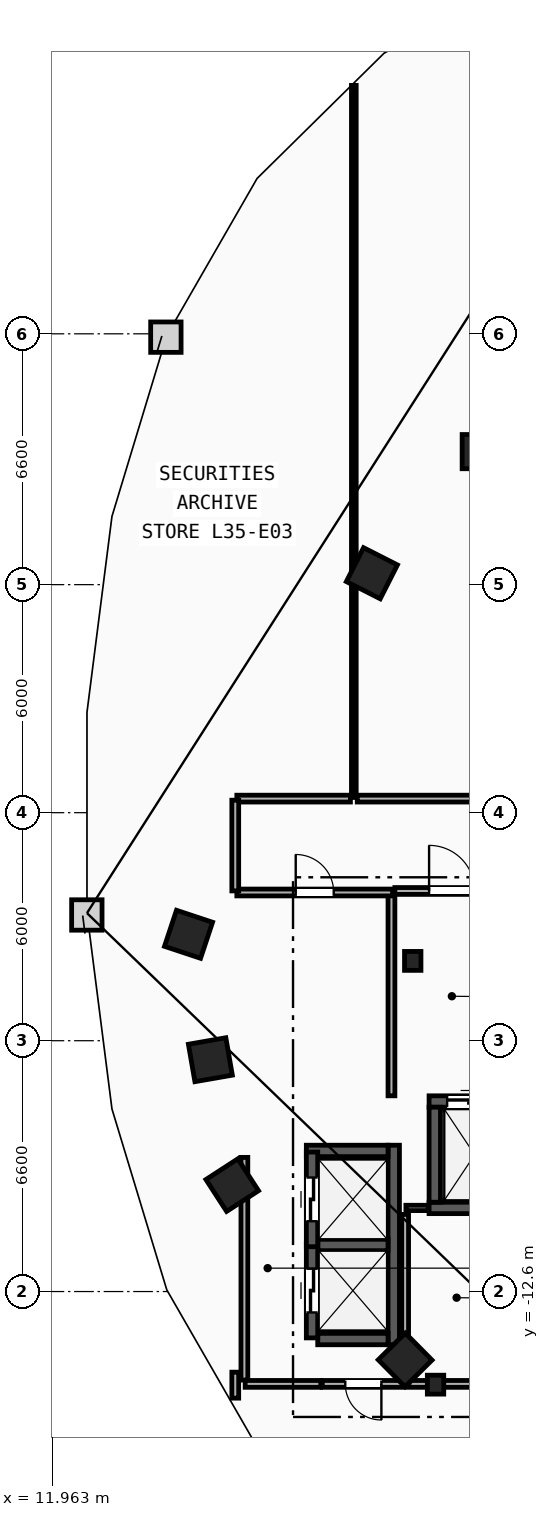
"""IFC4 building model, lengths in metres.
Left out: names, types, materials, properties, quantities, classifications, styles, units other than length and angle.
Written with IfcOpenShell. Run it as: python <this file> out.ifc"""

import sys

from ifc_helpers import new_model, si_unit, direction, frame, frame_2d, origin, origin_2d, place, context, subcontext, project, spatial, rectangle, i_section, extrude, element, fill, save


model = new_model("IFC4")
c1 = context("Model", 3, precision=1e-05, world=origin(), true_north=direction((0.0, 1.0)))
c2 = subcontext(c1, "Body", "Model", "MODEL_VIEW")
j1 = project(units=[si_unit("LENGTHUNIT", "METRE"), si_unit("PLANEANGLEUNIT", "RADIAN")], contexts=[c1])
p1 = place(None, origin())
s1 = spatial("IfcSite", under=j1, at=p1, CompositionType="ELEMENT")
p2 = place(p1, origin())
s2 = spatial("IfcBuilding", under=s1, at=p2, CompositionType="ELEMENT")
p3 = place(p2, frame((0.0, 0.0, 136.8)))
s3 = spatial("IfcBuildingStorey", under=s2, at=p3, CompositionType="ELEMENT", Elevation=136.8)
for number, where, z_axis, x_axis in (
    (1, (21.45, -3.9, 0.0), (0.0, 0.0, 1.0), (1.0, 0.0, 0.0)),
    (2, (22.05, -15.05, 0.0), (0.0, 0.0, 1.0), (1.0, 0.0, 0.0)),
):
    element("IfcColumn", number, at=place(p3, frame(where, z_axis=z_axis, x_axis=x_axis)), inside=s3, PredefinedType="COLUMN", context=c2, shape_type="SweptSolid", body=[
        extrude(i_section(OverallWidth=0.432, OverallDepth=0.498, WebThickness=0.056, FlangeThickness=0.089, FilletRadius=0.018, at=origin_2d()), origin(), (0.0, 0.0, 1.0), 3.6),
    ])
p4 = place(p3, frame((23.2, 9.5, 0.0), z_axis=(0.0, 0.0, 1.0), x_axis=(1.0, 0.0, 0.0)))
e3 = element("IfcColumn", 3, at=p4, inside=s3, PredefinedType="COLUMN", context=c2, shape_type="SweptSolid", body=[
    extrude(rectangle(XDim=0.9, YDim=0.9, at=origin_2d()), origin(), (0.0, 0.0, 1.0), 3.6),
])
for number, where, z_axis, x_axis in (
    (4, (15.55, -3.2, 0.0), (0.0, 0.0, 1.0), (-0.315, -0.949, 0.0)),
    (5, (16.125, -6.5, 0.0), (0.0, 0.0, 1.0), (0.172, -0.985, 0.0)),
    (6, (16.7, -9.8, 0.0), (0.0, 0.0, 1.0), (0.544, -0.839, 0.0)),
    (7, (21.25, -14.4, 0.0), (0.0, 0.0, 1.0), (0.703, -0.711, 0.0)),
    (8, (20.375, 6.3, 0.0), (0.0, 0.0, 1.0), (-0.453, -0.892, 0.0)),
):
    element("IfcColumn", number, at=place(p3, frame(where, z_axis=z_axis, x_axis=x_axis)), inside=s3, PredefinedType="COLUMN", context=c2, shape_type="SweptSolid", body=[
        extrude(rectangle(XDim=1.0, YDim=1.0, at=origin_2d()), origin(), (0.0, 0.0, 1.0), 3.6),
    ])
p5 = place(p3, frame((20.89, -7.45, 0.0), z_axis=(0.0, 0.0, 1.0), x_axis=(0.0, 1.0, 0.0)))
e9 = element("IfcWall", 9, at=p5, inside=s3, PredefinedType="PARTITIONING", context=c2, shape_type="SweptSolid", body=[
    extrude(rectangle(XDim=5.3, YDim=0.18, at=frame_2d((2.65, 0.0))), origin(), (0.0, 0.0, 1.0), 3.36),
])
p6 = place(p3, frame((20.98, -2.06, 0.0), z_axis=(0.0, 0.0, 1.0), x_axis=(1.0, 0.0, 0.0)))
e10 = element("IfcWall", 10, at=p6, inside=s3, PredefinedType="PARTITIONING", context=c2, shape_type="SweptSolid", body=[
    extrude(rectangle(XDim=3.0, YDim=0.18, at=frame_2d((1.5, 0.0))), origin(), (0.0, 0.0, 1.0), 3.36),
])
p7 = place(p6, frame((0.9, 0.0, 0.0)))
e11 = element("IfcOpeningElement", 11, at=p7, cuts=e10, PredefinedType="OPENING", context=c2, shape_type="SweptSolid", body=[
    extrude(rectangle(XDim=1.2, YDim=2.15, at=frame_2d((0.6, 1.075))), frame((0.0, 0.1, 0.0), z_axis=(0.0, -1.0, 0.0), x_axis=(1.0, 0.0, 0.0)), (0.0, 0.0, 1.0), 0.2),
])
p8 = place(p3, frame((21.88, -7.6, 0.0), z_axis=(0.0, 0.0, 1.0), x_axis=(1.0, 0.0, 0.0)))
e12 = element("IfcWall", 12, at=p8, inside=s3, PredefinedType="SHEAR", context=c2, shape_type="SweptSolid", body=[
    extrude(rectangle(XDim=2.1, YDim=0.3, at=frame_2d((1.05, 0.0))), origin(), (0.0, 0.0, 1.0), 3.36),
])
p9 = place(p8, frame((0.475, 0.0, 0.0)))
e13 = element("IfcOpeningElement", 13, at=p9, cuts=e12, PredefinedType="OPENING", context=c2, shape_type="SweptSolid", body=[
    extrude(rectangle(XDim=1.15, YDim=2.2, at=frame_2d((0.575, 1.1))), frame((0.0, 0.16, 0.0), z_axis=(0.0, -1.0, 0.0), x_axis=(1.0, 0.0, 0.0)), (0.0, 0.0, 1.0), 0.32),
])
p10 = place(p3, frame((21.88, -10.4, 0.0), z_axis=(0.0, 0.0, 1.0), x_axis=(1.0, 0.0, 0.0)))
e14 = element("IfcWall", 14, at=p10, inside=s3, PredefinedType="SHEAR", context=c2, shape_type="SweptSolid", body=[
    extrude(rectangle(XDim=2.1, YDim=0.3, at=frame_2d((1.05, 0.0))), origin(), (0.0, 0.0, 1.0), 3.36),
])
p11 = place(p3, frame((22.03, -10.25, 0.0), z_axis=(0.0, 0.0, 1.0), x_axis=(0.0, 1.0, 0.0)))
e15 = element("IfcWall", 15, at=p11, inside=s3, PredefinedType="SHEAR", context=c2, shape_type="SweptSolid", body=[
    extrude(rectangle(XDim=2.5, YDim=0.3, at=frame_2d((1.25, 0.0))), origin(), (0.0, 0.0, 1.0), 3.36),
])
p12 = place(p3, frame((20.95, -14.0, 0.0), z_axis=(0.0, 0.0, 1.0), x_axis=(0.0, 1.0, 0.0)))
e16 = element("IfcWall", 16, at=p12, inside=s3, PredefinedType="SHEAR", context=c2, shape_type="SweptSolid", body=[
    extrude(rectangle(XDim=5.25, YDim=0.3, at=frame_2d((2.625, 0.0))), origin(), (0.0, 0.0, 1.0), 3.36),
])
p13 = place(p3, frame((18.95, -13.85, 0.0), z_axis=(0.0, 0.0, 1.0), x_axis=(1.0, 0.0, 0.0)))
e17 = element("IfcWall", 17, at=p13, inside=s3, PredefinedType="SHEAR", context=c2, shape_type="SweptSolid", body=[
    extrude(rectangle(XDim=1.85, YDim=0.3, at=frame_2d((0.925, 0.0))), origin(), (0.0, 0.0, 1.0), 3.36),
])
p14 = place(p3, frame((18.65, -8.9, 0.0), z_axis=(0.0, 0.0, 1.0), x_axis=(1.0, 0.0, 0.0)))
e18 = element("IfcWall", 18, at=p14, inside=s3, PredefinedType="SHEAR", context=c2, shape_type="SweptSolid", body=[
    extrude(rectangle(XDim=2.15, YDim=0.3, at=frame_2d((1.075, 0.0))), origin(), (0.0, 0.0, 1.0), 3.36),
])
p15 = place(p3, frame((18.95, -11.375, 0.0), z_axis=(0.0, 0.0, 1.0), x_axis=(1.0, 0.0, 0.0)))
e19 = element("IfcWall", 19, at=p15, inside=s3, PredefinedType="SHEAR", context=c2, shape_type="SweptSolid", body=[
    extrude(rectangle(XDim=1.85, YDim=0.3, at=frame_2d((0.925, 0.0))), origin(), (0.0, 0.0, 1.0), 3.36),
])
p16 = place(p3, frame((18.8, -13.82, 0.0), z_axis=(0.0, 0.0, 1.0), x_axis=(0.0, 1.0, 0.0)))
e20 = element("IfcWall", 20, at=p16, inside=s3, PredefinedType="SHEAR", context=c2, shape_type="SweptSolid", body=[
    extrude(rectangle(XDim=2.49, YDim=0.3, at=frame_2d((1.245, 0.0))), origin(), (0.0, 0.0, 1.0), 3.36),
])
p17 = place(p16, frame((0.67, 0.0, 0.0)))
e21 = element("IfcOpeningElement", 21, at=p17, cuts=e20, PredefinedType="OPENING", context=c2, shape_type="SweptSolid", body=[
    extrude(rectangle(XDim=1.15, YDim=2.2, at=frame_2d((0.575, 1.1))), frame((0.0, 0.16, 0.0), z_axis=(0.0, -1.0, 0.0), x_axis=(1.0, 0.0, 0.0)), (0.0, 0.0, 1.0), 0.32),
])
p18 = place(p3, frame((18.8, -11.42, 0.0), z_axis=(0.0, 0.0, 1.0), x_axis=(0.0, 1.0, 0.0)))
e22 = element("IfcWall", 22, at=p18, inside=s3, PredefinedType="SHEAR", context=c2, shape_type="SweptSolid", body=[
    extrude(rectangle(XDim=2.49, YDim=0.3, at=frame_2d((1.245, 0.0))), origin(), (0.0, 0.0, 1.0), 3.36),
])
p19 = place(p18, frame((0.67, 0.0, 0.0)))
e23 = element("IfcOpeningElement", 23, at=p19, cuts=e22, PredefinedType="OPENING", context=c2, shape_type="SweptSolid", body=[
    extrude(rectangle(XDim=1.15, YDim=2.2, at=frame_2d((0.575, 1.1))), frame((0.0, 0.16, 0.0), z_axis=(0.0, -1.0, 0.0), x_axis=(1.0, 0.0, 0.0)), (0.0, 0.0, 1.0), 0.32),
])
p20 = place(p3, frame((17.02, -14.93, 0.0), z_axis=(0.0, 0.0, 1.0), x_axis=(0.0, 1.0, 0.0)))
e24 = element("IfcWall", 24, at=p20, inside=s3, PredefinedType="PARTITIONING", context=c2, shape_type="SweptSolid", body=[
    extrude(rectangle(XDim=5.86, YDim=0.18, at=frame_2d((2.93, 0.0))), origin(), (0.0, 0.0, 1.0), 3.36),
])
p21 = place(p3, frame((17.04, -15.03, 0.0), z_axis=(0.0, 0.0, 1.0), x_axis=(1.0, 0.0, 0.0)))
e25 = element("IfcWall", 25, at=p21, inside=s3, PredefinedType="PARTITIONING", context=c2, shape_type="SweptSolid", body=[
    extrude(rectangle(XDim=1.99, YDim=0.18, at=frame_2d((0.995, 0.0))), origin(), (0.0, 0.0, 1.0), 3.36),
])
p22 = place(p3, frame((21.23, -15.03, 0.0), z_axis=(0.0, 0.0, 1.0), x_axis=(-1.0, 0.0, 0.0)))
e26 = element("IfcWall", 26, at=p22, inside=s3, PredefinedType="PARTITIONING", context=c2, shape_type="SweptSolid", body=[
    extrude(rectangle(XDim=2.16, YDim=0.18, at=frame_2d((1.08, 0.0))), origin(), (0.0, 0.0, 1.0), 3.36),
])
p23 = place(p22, frame((0.605, 0.0, 0.0)))
e27 = element("IfcOpeningElement", 27, at=p23, cuts=e26, PredefinedType="OPENING", context=c2, shape_type="SweptSolid", body=[
    extrude(rectangle(XDim=0.95, YDim=2.1, at=frame_2d((0.475, 1.05))), frame((0.0, 0.1, 0.0), z_axis=(0.0, -1.0, 0.0), x_axis=(1.0, 0.0, 0.0)), (0.0, 0.0, 1.0), 0.2),
])
p24 = place(p3, frame((21.27, -10.4, 0.0), z_axis=(0.0, 0.0, 1.0), x_axis=(1.0, 0.0, 0.0)))
e28 = element("IfcWall", 28, at=p24, inside=s3, PredefinedType="PARTITIONING", context=c2, shape_type="SweptSolid", body=[
    extrude(rectangle(XDim=0.59, YDim=0.14, at=frame_2d((0.295, 0.0))), origin(), (0.0, 0.0, 1.0), 3.36),
])
p25 = place(p3, frame((21.25, -14.93, 0.0), z_axis=(0.0, 0.0, 1.0), x_axis=(0.0, 1.0, 0.0)))
e29 = element("IfcWall", 29, at=p25, inside=s3, PredefinedType="PARTITIONING", context=c2, shape_type="SweptSolid", body=[
    extrude(rectangle(XDim=4.36, YDim=0.18, at=frame_2d((2.18, 0.0))), origin(), (0.0, 0.0, 1.0), 3.36),
])
p26 = place(p3, frame((21.35, -15.03, 0.0), z_axis=(0.0, 0.0, 1.0), x_axis=(1.0, 0.0, 0.0)))
e30 = element("IfcWall", 30, at=p26, inside=s3, PredefinedType="PARTITIONING", context=c2, shape_type="SweptSolid", body=[
    extrude(rectangle(XDim=2.61, YDim=0.18, at=frame_2d((1.305, 0.0))), origin(), (0.0, 0.0, 1.0), 2.433),
])
p27 = place(p3, frame((19.9, 0.4, 0.0), z_axis=(0.0, 0.0, 1.0), x_axis=(0.0, 1.0, 0.0)))
e31 = element("IfcWall", 31, at=p27, inside=s3, PredefinedType="PARTITIONING", context=c2, shape_type="SweptSolid", body=[
    extrude(rectangle(XDim=18.737, YDim=0.125, at=frame_2d((9.368, 0.0))), origin(), (0.0, 0.0, 1.0), 3.36),
])
p28 = place(p3, frame((16.822, -2.1, 0.0), z_axis=(0.0, 0.0, 1.0), x_axis=(1.0, 0.0, 0.0)))
e32 = element("IfcWall", 32, at=p28, inside=s3, PredefinedType="PARTITIONING", context=c2, shape_type="SweptSolid", body=[
    extrude(rectangle(XDim=4.098, YDim=0.18, at=frame_2d((2.049, 0.0))), origin(), (0.0, 0.0, 1.0), 3.36),
])
p29 = place(p28, frame((1.549, 0.0, 0.0)))
e33 = element("IfcOpeningElement", 33, at=p29, cuts=e32, PredefinedType="OPENING", context=c2, shape_type="SweptSolid", body=[
    extrude(rectangle(XDim=1.0, YDim=2.15, at=frame_2d((0.5, 1.075))), frame((0.0, 0.1, 0.0), z_axis=(0.0, -1.0, 0.0), x_axis=(1.0, 0.0, 0.0)), (0.0, 0.0, 1.0), 0.2),
])
p30 = place(p3, frame((19.81, 0.37, 0.0), z_axis=(0.0, 0.0, 1.0), x_axis=(-1.0, 0.0, 0.0)))
e34 = element("IfcWall", 34, at=p30, inside=s3, PredefinedType="PARTITIONING", context=c2, shape_type="SweptSolid", body=[
    extrude(rectangle(XDim=2.989, YDim=0.18, at=frame_2d((1.494, 0.0))), origin(), (0.0, 0.0, 1.0), 3.36),
])
p31 = place(p3, frame((16.78, 0.329, 0.0), z_axis=(0.0, 0.0, 1.0), x_axis=(0.0, -1.0, 0.0)))
e35 = element("IfcWall", 35, at=p31, inside=s3, PredefinedType="PARTITIONING", context=c2, shape_type="SweptSolid", body=[
    extrude(rectangle(XDim=2.387, YDim=0.18, at=frame_2d((1.194, 0.0))), origin(), (0.0, 0.0, 1.0), 3.36),
])
p32 = place(p3, frame((16.78, -14.721, 0.0), z_axis=(0.0, 0.0, 1.0), x_axis=(0.0, -1.0, 0.0)))
e36 = element("IfcWall", 36, at=p32, inside=s3, PredefinedType="PARTITIONING", context=c2, shape_type="SweptSolid", body=[
    extrude(rectangle(XDim=0.684, YDim=0.18, at=frame_2d((0.342, 0.0))), origin(), (0.0, 0.0, 1.0), 3.36),
])
p33 = place(p3, frame((25.4, 0.37, 0.0), z_axis=(0.0, 0.0, 1.0), x_axis=(-1.0, 0.0, 0.0)))
e37 = element("IfcWall", 37, at=p33, inside=s3, PredefinedType="PARTITIONING", context=c2, shape_type="SweptSolid", body=[
    extrude(rectangle(XDim=5.41, YDim=0.18, at=frame_2d((2.705, 0.0))), origin(), (0.0, 0.0, 1.0), 3.36),
])
p34 = place(p7, origin())
e38 = element("IfcDoor", 38, at=p34, inside=s3, OperationType="SINGLE_SWING_LEFT", PredefinedType="DOOR", context=c2, shape_type="SweptSolid", body=[
    extrude(rectangle(XDim=1.2, YDim=2.15, at=frame_2d((0.6, 1.075))), frame((0.0, 0.025, 0.0), z_axis=(0.0, -1.0, 0.0), x_axis=(1.0, 0.0, 0.0)), (0.0, 0.0, 1.0), 0.05),
])
fill(e11, e38)
p35 = place(p9, origin())
e39 = element("IfcDoor", 39, at=p35, inside=s3, OperationType="SLIDING_TO_LEFT", PredefinedType="TRAPDOOR", context=c2, shape_type="SweptSolid", body=[
    extrude(rectangle(XDim=1.15, YDim=2.2, at=frame_2d((0.575, 1.1))), frame((0.0, 0.025, 0.0), z_axis=(0.0, -1.0, 0.0), x_axis=(1.0, 0.0, 0.0)), (0.0, 0.0, 1.0), 0.05),
])
fill(e13, e39)
p36 = place(p17, origin())
e40 = element("IfcDoor", 40, at=p36, inside=s3, OperationType="SLIDING_TO_LEFT", PredefinedType="TRAPDOOR", context=c2, shape_type="SweptSolid", body=[
    extrude(rectangle(XDim=1.15, YDim=2.2, at=frame_2d((0.575, 1.1))), frame((0.0, 0.025, 0.0), z_axis=(0.0, -1.0, 0.0), x_axis=(1.0, 0.0, 0.0)), (0.0, 0.0, 1.0), 0.05),
])
fill(e21, e40)
p37 = place(p19, origin())
e41 = element("IfcDoor", 41, at=p37, inside=s3, OperationType="SLIDING_TO_LEFT", PredefinedType="TRAPDOOR", context=c2, shape_type="SweptSolid", body=[
    extrude(rectangle(XDim=1.15, YDim=2.2, at=frame_2d((0.575, 1.1))), frame((0.0, 0.025, 0.0), z_axis=(0.0, -1.0, 0.0), x_axis=(1.0, 0.0, 0.0)), (0.0, 0.0, 1.0), 0.05),
])
fill(e23, e41)
p38 = place(p29, origin())
e42 = element("IfcDoor", 42, at=p38, inside=s3, OperationType="SINGLE_SWING_LEFT", PredefinedType="DOOR", context=c2, shape_type="SweptSolid", body=[
    extrude(rectangle(XDim=1.0, YDim=2.15, at=frame_2d((0.5, 1.075))), frame((0.0, 0.025, 0.0), z_axis=(0.0, -1.0, 0.0), x_axis=(1.0, 0.0, 0.0)), (0.0, 0.0, 1.0), 0.05),
])
fill(e33, e42)
p39 = place(p23, origin())
e43 = element("IfcDoor", 43, at=p39, inside=s3, OperationType="SINGLE_SWING_LEFT", PredefinedType="DOOR", context=c2, shape_type="SweptSolid", body=[
    extrude(rectangle(XDim=0.95, YDim=2.1, at=frame_2d((0.475, 1.05))), frame((0.0, 0.025, 0.0), z_axis=(0.0, -1.0, 0.0), x_axis=(1.0, 0.0, 0.0)), (0.0, 0.0, 1.0), 0.05),
])
fill(e27, e43)
save(model, sys.argv[1])
